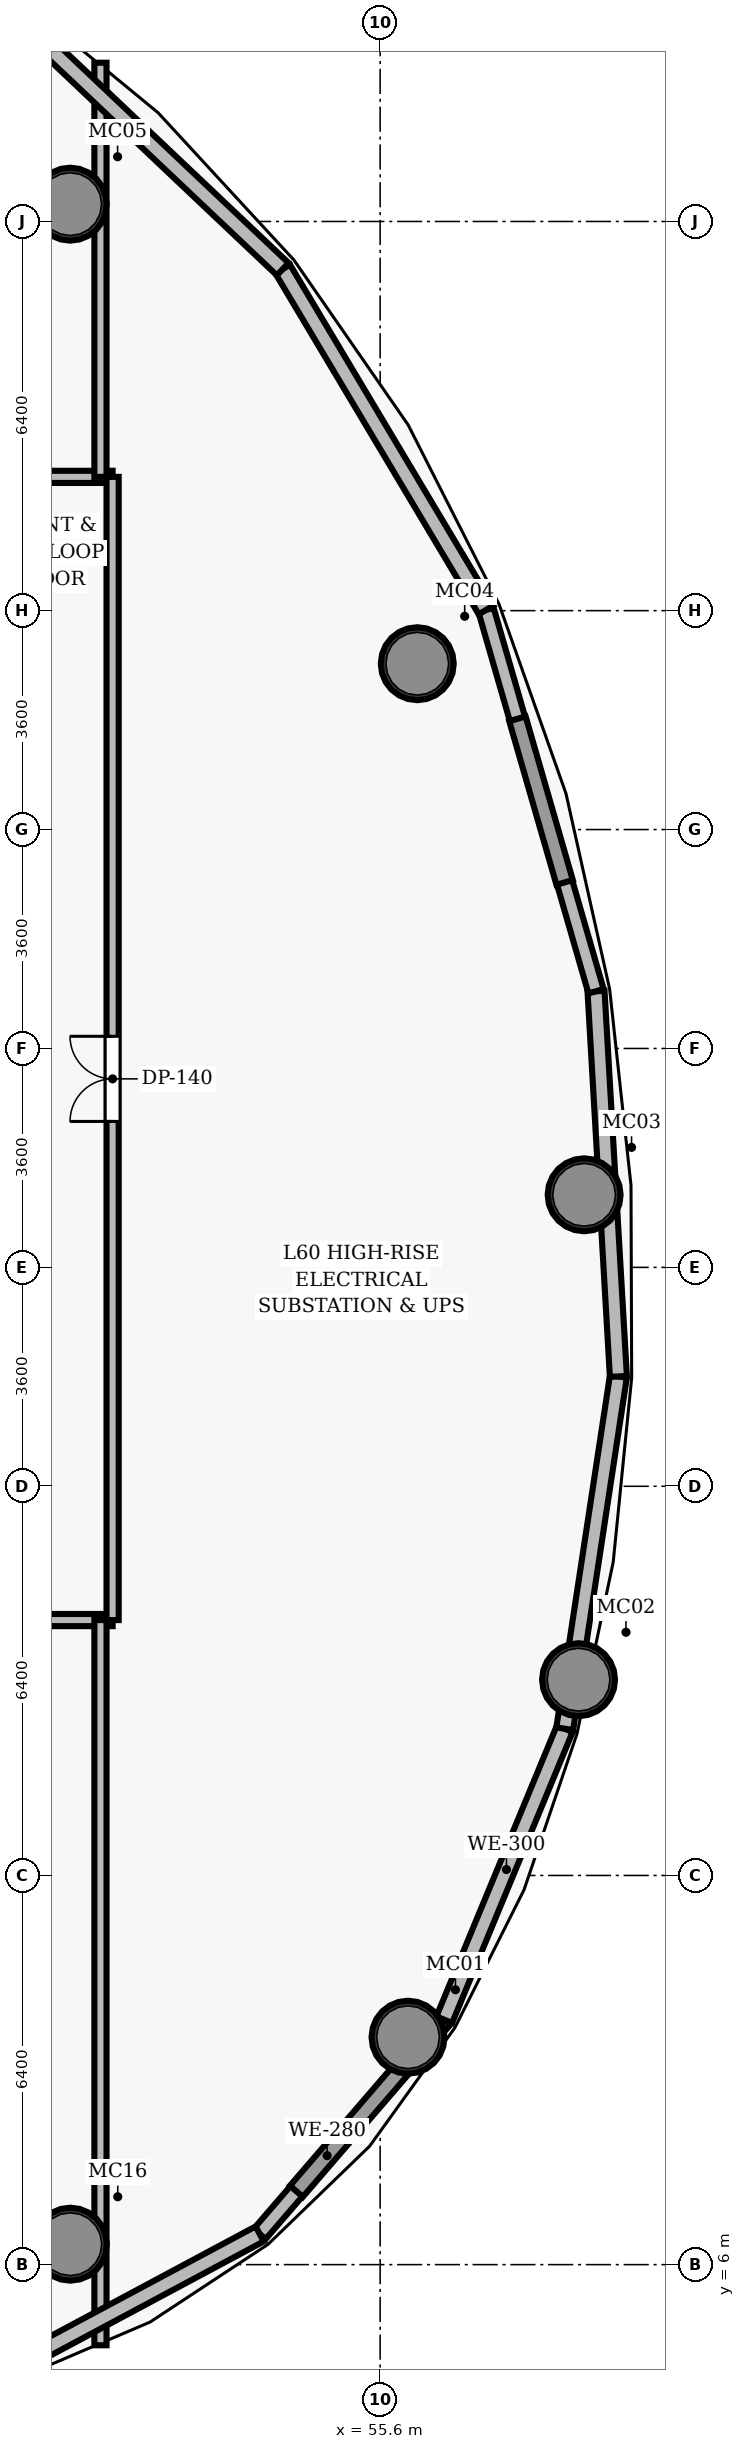
"""IFC4 building model, lengths in metres.
Left out: names, types, materials, properties, quantities, classifications, styles, units other than length and angle.
Written with IfcOpenShell. Run it as: python <this file> out.ifc"""

import sys

from ifc_helpers import new_model, si_unit, direction, frame, frame_2d, origin, origin_2d, place, context, subcontext, project, spatial, rectangle, hollow_circle, extrude, element, fill, save


model = new_model("IFC4")
c1 = context("Model", 3, precision=1e-05, world=origin(), true_north=direction((0.0, 1.0)))
c2 = subcontext(c1, "Body", "Model", "MODEL_VIEW")
j1 = project(units=[si_unit("LENGTHUNIT", "METRE"), si_unit("PLANEANGLEUNIT", "RADIAN")], contexts=[c1])
p1 = place(None, origin())
s1 = spatial("IfcSite", under=j1, at=p1, CompositionType="ELEMENT")
p2 = place(p1, origin())
s2 = spatial("IfcBuilding", under=s1, at=p2, CompositionType="ELEMENT")
p3 = place(p2, frame((0.0, 0.0, 236.65)))
s3 = spatial("IfcBuildingStorey", under=s2, at=p3, CompositionType="ELEMENT", Elevation=236.65)
for number, where, z_axis, x_axis in (
    (1, (56.058, 9.74, 0.0), (0.0, 0.0, 1.0), (1.0, 0.0, 0.0)),
    (2, (58.863, 15.619, 0.0), (0.0, 0.0, 1.0), (1.0, 0.0, 0.0)),
    (3, (58.955, 23.594, 0.0), (0.0, 0.0, 1.0), (1.0, 0.0, 0.0)),
    (4, (56.21, 32.327, 0.0), (0.0, 0.0, 1.0), (1.0, 0.0, 0.0)),
    (5, (50.502, 39.885, 0.0), (0.0, 0.0, 1.0), (1.0, 0.0, 0.0)),
    (6, (50.504, 6.336, 0.0), (0.0, 0.0, 1.0), (1.0, 0.0, 0.0)),
):
    element("IfcColumn", number, at=place(p3, frame(where, z_axis=z_axis, x_axis=x_axis)), inside=s3, PredefinedType="COLUMN", context=c2, shape_type="SweptSolid", body=[
        extrude(hollow_circle(Radius=0.6, WallThickness=0.05, at=origin_2d()), origin(), (0.0, 0.0, 1.0), 5.4),
    ])
p4 = place(p3, frame((24.8, 35.4, 0.0), z_axis=(0.0, 0.0, 1.0), x_axis=(1.0, 0.0, 0.0)))
e7 = element("IfcWall", 7, at=p4, inside=s3, PredefinedType="PARTITIONING", context=c2, shape_type="SweptSolid", body=[
    extrude(rectangle(XDim=26.4, YDim=0.2, at=frame_2d((13.2, 0.0))), origin(), (0.0, 0.0, 1.0), 4.04),
])
p5 = place(p4, frame((11.5, 0.0, 0.0)))
e8 = element("IfcOpeningElement", 8, at=p5, cuts=e7, PredefinedType="OPENING", context=c2, shape_type="SweptSolid", body=[
    extrude(rectangle(XDim=1.4, YDim=2.25, at=frame_2d((0.7, 1.125))), frame((0.0, 0.11, 0.0), z_axis=(0.0, -1.0, 0.0), x_axis=(1.0, 0.0, 0.0)), (0.0, 0.0, 1.0), 0.22),
])
p6 = place(p3, frame((24.8, 16.6, 0.0), z_axis=(0.0, 0.0, 1.0), x_axis=(1.0, 0.0, 0.0)))
e9 = element("IfcWall", 9, at=p6, inside=s3, PredefinedType="PARTITIONING", context=c2, shape_type="SweptSolid", body=[
    extrude(rectangle(XDim=26.4, YDim=0.2, at=frame_2d((13.2, 0.0))), origin(), (0.0, 0.0, 1.0), 4.04),
])
p7 = place(p6, frame((11.5, 0.0, 0.0)))
e10 = element("IfcOpeningElement", 10, at=p7, cuts=e9, PredefinedType="OPENING", context=c2, shape_type="SweptSolid", body=[
    extrude(rectangle(XDim=1.8, YDim=2.35, at=frame_2d((0.9, 1.175))), frame((0.0, 0.11, 0.0), z_axis=(0.0, -1.0, 0.0), x_axis=(1.0, 0.0, 0.0)), (0.0, 0.0, 1.0), 0.22),
])
p8 = place(p3, frame((51.2, 16.6, 0.0), z_axis=(0.0, 0.0, 1.0), x_axis=(0.0, 1.0, 0.0)))
e11 = element("IfcWall", 11, at=p8, inside=s3, PredefinedType="PARTITIONING", context=c2, shape_type="SweptSolid", body=[
    extrude(rectangle(XDim=18.8, YDim=0.2, at=frame_2d((9.4, 0.0))), origin(), (0.0, 0.0, 1.0), 4.04),
])
p9 = place(p8, frame((8.2, 0.0, 0.0)))
e12 = element("IfcOpeningElement", 12, at=p9, cuts=e11, PredefinedType="OPENING", context=c2, shape_type="SweptSolid", body=[
    extrude(rectangle(XDim=1.4, YDim=2.25, at=frame_2d((0.7, 1.125))), frame((0.0, 0.11, 0.0), z_axis=(0.0, -1.0, 0.0), x_axis=(1.0, 0.0, 0.0)), (0.0, 0.0, 1.0), 0.22),
])
p10 = place(p3, frame((51.0, 4.674, 0.0), z_axis=(0.0, 0.0, 1.0), x_axis=(0.0, 1.0, 0.0)))
e13 = element("IfcWall", 13, at=p10, inside=s3, PredefinedType="PARTITIONING", context=c2, shape_type="SweptSolid", body=[
    extrude(rectangle(XDim=11.926, YDim=0.2, at=frame_2d((5.963, 0.0))), origin(), (0.0, 0.0, 1.0), 4.04),
])
p11 = place(p3, frame((51.0, 35.4, 0.0), z_axis=(0.0, 0.0, 1.0), x_axis=(0.0, 1.0, 0.0)))
e14 = element("IfcWall", 14, at=p11, inside=s3, PredefinedType="PARTITIONING", context=c2, shape_type="SweptSolid", body=[
    extrude(rectangle(XDim=6.811, YDim=0.2, at=frame_2d((3.406, 0.0))), origin(), (0.0, 0.0, 1.0), 4.04),
])
p12 = place(p3, frame((56.655, 10.028, 0.0), z_axis=(0.0, 0.0, 1.0), x_axis=(-0.65279941613, -0.757530806173, 0.0)))
e15 = element("IfcWall", 15, at=p12, inside=s3, PredefinedType="SOLIDWALL", context=c2, shape_type="SweptSolid", body=[
    extrude(rectangle(XDim=4.651, YDim=0.26, at=frame_2d((2.325, 0.0))), origin(), (0.0, 0.0, 1.0), 4.98),
])
p13 = place(p3, frame((58.636, 14.813, 0.0), z_axis=(0.0, 0.0, 1.0), x_axis=(-0.382579387881, -0.923922622284, 0.0)))
e16 = element("IfcWall", 16, at=p13, inside=s3, PredefinedType="SOLIDWALL", context=c2, shape_type="SweptSolid", body=[
    extrude(rectangle(XDim=5.179, YDim=0.28, at=frame_2d((2.59, 0.0))), origin(), (0.0, 0.0, 1.0), 4.98),
])
p14 = place(p3, frame((59.518, 20.606, 0.0), z_axis=(0.0, 0.0, 1.0), x_axis=(-0.150526090897, -0.988606036781, 0.0)))
e17 = element("IfcWall", 17, at=p14, inside=s3, PredefinedType="SOLIDWALL", context=c2, shape_type="SweptSolid", body=[
    extrude(rectangle(XDim=5.86, YDim=0.28, at=frame_2d((2.93, 0.0))), origin(), (0.0, 0.0, 1.0), 4.98),
])
p15 = place(p3, frame((59.15, 26.941, 0.0), z_axis=(0.0, 0.0, 1.0), x_axis=(0.057946099127, -0.998319713116, 0.0)))
e18 = element("IfcWall", 18, at=p15, inside=s3, PredefinedType="SOLIDWALL", context=c2, shape_type="SweptSolid", body=[
    extrude(rectangle(XDim=6.345, YDim=0.28, at=frame_2d((3.173, 0.0))), origin(), (0.0, 0.0, 1.0), 4.98),
])
p16 = place(p3, frame((57.342, 33.211, 0.0), z_axis=(0.0, 0.0, 1.0), x_axis=(0.277165964475, -0.960822058519, 0.0)))
e19 = element("IfcWall", 19, at=p16, inside=s3, PredefinedType="SOLIDWALL", context=c2, shape_type="SweptSolid", body=[
    extrude(rectangle(XDim=6.526, YDim=0.26, at=frame_2d((3.263, 0.0))), origin(), (0.0, 0.0, 1.0), 4.98),
])
p17 = place(p3, frame((53.998, 38.816, 0.0), z_axis=(0.0, 0.0, 1.0), x_axis=(0.512337833972, -0.858783991397, 0.0)))
e20 = element("IfcWall", 20, at=p17, inside=s3, PredefinedType="SOLIDWALL", context=c2, shape_type="SweptSolid", body=[
    extrude(rectangle(XDim=6.527, YDim=0.28, at=frame_2d((3.263, 0.0))), origin(), (0.0, 0.0, 1.0), 4.98),
])
p18 = place(p3, frame((49.257, 43.302, 0.0), z_axis=(0.0, 0.0, 1.0), x_axis=(0.726362423444, -0.687311886852, 0.0)))
e21 = element("IfcWall", 21, at=p18, inside=s3, PredefinedType="SOLIDWALL", context=c2, shape_type="SweptSolid", body=[
    extrude(rectangle(XDim=6.527, YDim=0.28, at=frame_2d((3.264, 0.0))), origin(), (0.0, 0.0, 1.0), 4.98),
])
p19 = place(p3, frame((53.619, 6.505, 0.0), z_axis=(0.0, 0.0, 1.0), x_axis=(-0.88168357973, -0.471841144067, 0.0)))
e22 = element("IfcWall", 22, at=p19, inside=s3, PredefinedType="SOLIDWALL", context=c2, shape_type="SweptSolid", body=[
    extrude(rectangle(XDim=4.651, YDim=0.28, at=frame_2d((2.325, 0.0))), origin(), (0.0, 0.0, 1.0), 4.98),
])
p20 = place(p9, origin())
e23 = element("IfcDoor", 23, at=p20, inside=s3, OperationType="DOUBLE_DOOR_SINGLE_SWING", PredefinedType="DOOR", context=c2, shape_type="SweptSolid", body=[
    extrude(rectangle(XDim=1.4, YDim=2.25, at=frame_2d((0.7, 1.125))), frame((0.0, 0.025, 0.0), z_axis=(0.0, -1.0, 0.0), x_axis=(1.0, 0.0, 0.0)), (0.0, 0.0, 1.0), 0.05),
])
fill(e12, e23)
save(model, sys.argv[1])
